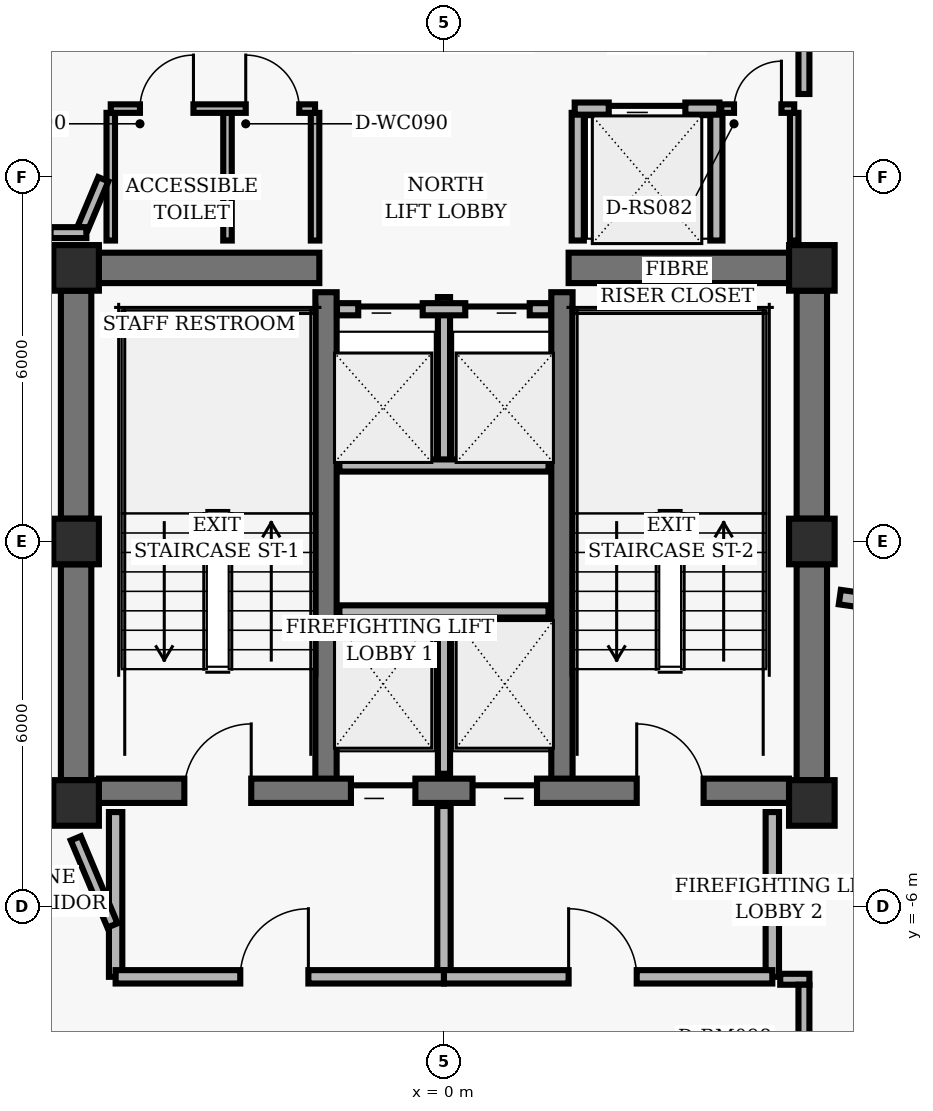
"""IFC4 building model, lengths in metres.
Left out: names, types, materials, properties, quantities, classifications, styles, units other than length and angle.
Written with IfcOpenShell. Run it as: python <this file> out.ifc"""

import sys

from ifc_helpers import new_model, si_unit, direction, frame, frame_2d, origin, origin_2d, place, context, subcontext, project, spatial, rectangle, hollow_rectangle, extrude, element, fill, save


model = new_model("IFC4")
c1 = context("Model", 3, precision=1e-05, world=origin(), true_north=direction((0.0, 1.0)))
c2 = subcontext(c1, "Body", "Model", "MODEL_VIEW")
j1 = project(units=[si_unit("LENGTHUNIT", "METRE"), si_unit("PLANEANGLEUNIT", "RADIAN")], contexts=[c1])
p1 = place(None, origin())
s1 = spatial("IfcSite", under=j1, at=p1, CompositionType="ELEMENT")
p2 = place(p1, origin())
s2 = spatial("IfcBuilding", under=s1, at=p2, CompositionType="ELEMENT")
p3 = place(p2, frame((0.0, 0.0, 205.76)))
s3 = spatial("IfcBuildingStorey", under=s2, at=p3, CompositionType="ELEMENT", Elevation=205.76)
for number, where, z_axis, x_axis in (
    (1, (-6.05, 4.5, 0.0), (0.0, 0.0, 1.0), (1.0, 0.0, 0.0)),
    (2, (6.05, 4.5, 0.0), (0.0, 0.0, 1.0), (1.0, 0.0, 0.0)),
    (3, (-6.05, 0.0, 0.0), (0.0, 0.0, 1.0), (1.0, 0.0, 0.0)),
    (4, (6.05, 0.0, 0.0), (0.0, 0.0, 1.0), (1.0, 0.0, 0.0)),
    (5, (-6.05, -4.3, 0.0), (0.0, 0.0, 1.0), (1.0, 0.0, 0.0)),
    (6, (6.05, -4.3, 0.0), (0.0, 0.0, 1.0), (1.0, 0.0, 0.0)),
):
    element("IfcColumn", number, at=place(p3, frame(where, z_axis=z_axis, x_axis=x_axis)), inside=s3, PredefinedType="COLUMN", context=c2, shape_type="SweptSolid", body=[
        extrude(hollow_rectangle(XDim=0.75, YDim=0.75, WallThickness=0.05, InnerFilletRadius=0.02, OuterFilletRadius=0.04, at=origin_2d()), origin(), (0.0, 0.0, 1.0), 3.04),
    ])
p4 = place(p3, frame((-6.05, 0.375, 0.0), z_axis=(0.0, 0.0, 1.0), x_axis=(0.0, 1.0, 0.0)))
e7 = element("IfcWall", 7, at=p4, inside=s3, PredefinedType="SHEAR", context=c2, shape_type="SweptSolid", body=[
    extrude(rectangle(XDim=3.75, YDim=0.5, at=frame_2d((1.875, 0.0))), origin(), (0.0, 0.0, 1.0), 2.798),
])
p5 = place(p3, frame((-6.05, -3.925, 0.0), z_axis=(0.0, 0.0, 1.0), x_axis=(0.0, 1.0, 0.0)))
e8 = element("IfcWall", 8, at=p5, inside=s3, PredefinedType="SHEAR", context=c2, shape_type="SweptSolid", body=[
    extrude(rectangle(XDim=3.55, YDim=0.5, at=frame_2d((1.775, 0.0))), origin(), (0.0, 0.0, 1.0), 2.798),
])
p6 = place(p3, frame((6.05, 0.375, 0.0), z_axis=(0.0, 0.0, 1.0), x_axis=(0.0, 1.0, 0.0)))
e9 = element("IfcWall", 9, at=p6, inside=s3, PredefinedType="SHEAR", context=c2, shape_type="SweptSolid", body=[
    extrude(rectangle(XDim=3.75, YDim=0.5, at=frame_2d((1.875, 0.0))), origin(), (0.0, 0.0, 1.0), 2.798),
])
p7 = place(p3, frame((6.05, -3.925, 0.0), z_axis=(0.0, 0.0, 1.0), x_axis=(0.0, 1.0, 0.0)))
e10 = element("IfcWall", 10, at=p7, inside=s3, PredefinedType="SHEAR", context=c2, shape_type="SweptSolid", body=[
    extrude(rectangle(XDim=3.55, YDim=0.5, at=frame_2d((1.775, 0.0))), origin(), (0.0, 0.0, 1.0), 2.798),
])
for number, where, z_axis, x_axis in (
    (11, (-1.94, -4.1, 0.0), (0.0, 0.0, 1.0), (0.0, 1.0, 0.0)),
    (12, (1.94, -4.1, 0.0), (0.0, 0.0, 1.0), (0.0, 1.0, 0.0)),
):
    element("IfcWall", number, at=place(p3, frame(where, z_axis=z_axis, x_axis=x_axis)), inside=s3, PredefinedType="SHEAR", context=c2, shape_type="SweptSolid", body=[
        extrude(rectangle(XDim=8.2, YDim=0.35, at=frame_2d((4.1, 0.0))), origin(), (0.0, 0.0, 1.0), 2.798),
    ])
p8 = place(p3, frame((-5.675, -4.1, 0.0), z_axis=(0.0, 0.0, 1.0), x_axis=(1.0, 0.0, 0.0)))
e13 = element("IfcWall", 13, at=p8, inside=s3, PredefinedType="SHEAR", context=c2, shape_type="SweptSolid", body=[
    extrude(rectangle(XDim=11.35, YDim=0.4, at=frame_2d((5.675, 0.0))), origin(), (0.0, 0.0, 1.0), 2.798),
])
p9 = place(p8, frame((1.405, 0.0, 0.0)))
e14 = element("IfcOpeningElement", 14, at=p9, cuts=e13, PredefinedType="OPENING", context=c2, shape_type="SweptSolid", body=[
    extrude(rectangle(XDim=1.1, YDim=2.04, at=frame_2d((0.55, 1.02))), frame((0.0, 0.21, 0.0), z_axis=(0.0, -1.0, 0.0), x_axis=(1.0, 0.0, 0.0)), (0.0, 0.0, 1.0), 0.42),
])
p10 = place(p8, frame((8.845, 0.0, 0.0)))
e15 = element("IfcOpeningElement", 15, at=p10, cuts=e13, PredefinedType="OPENING", context=c2, shape_type="SweptSolid", body=[
    extrude(rectangle(XDim=1.1, YDim=2.04, at=frame_2d((0.55, 1.02))), frame((0.0, 0.21, 0.0), z_axis=(0.0, -1.0, 0.0), x_axis=(1.0, 0.0, 0.0)), (0.0, 0.0, 1.0), 0.42),
])
p11 = place(p8, frame((4.145, 0.0, 0.0)))
e16 = element("IfcOpeningElement", 16, at=p11, cuts=e13, PredefinedType="OPENING", context=c2, shape_type="SweptSolid", body=[
    extrude(rectangle(XDim=1.06, YDim=2.04, at=frame_2d((0.53, 1.02))), frame((0.0, 0.21, 0.0), z_axis=(0.0, -1.0, 0.0), x_axis=(1.0, 0.0, 0.0)), (0.0, 0.0, 1.0), 0.42),
])
p12 = place(p8, frame((6.145, 0.0, 0.0)))
e17 = element("IfcOpeningElement", 17, at=p12, cuts=e13, PredefinedType="OPENING", context=c2, shape_type="SweptSolid", body=[
    extrude(rectangle(XDim=1.06, YDim=2.04, at=frame_2d((0.53, 1.02))), frame((0.0, 0.21, 0.0), z_axis=(0.0, -1.0, 0.0), x_axis=(1.0, 0.0, 0.0)), (0.0, 0.0, 1.0), 0.42),
])
for number, where, z_axis, x_axis in (
    (18, (-5.675, 4.5, 0.0), (0.0, 0.0, 1.0), (1.0, 0.0, 0.0)),
    (19, (2.05, 4.5, 0.0), (0.0, 0.0, 1.0), (1.0, 0.0, 0.0)),
):
    element("IfcWall", number, at=place(p3, frame(where, z_axis=z_axis, x_axis=x_axis)), inside=s3, PredefinedType="SHEAR", context=c2, shape_type="SweptSolid", body=[
        extrude(rectangle(XDim=3.625, YDim=0.5, at=frame_2d((1.812, 0.0))), origin(), (0.0, 0.0, 1.0), 2.798),
    ])
p13 = place(p3, frame((0.0, -3.82, 0.0), z_axis=(0.0, 0.0, 1.0), x_axis=(0.0, 1.0, 0.0)))
e20 = element("IfcWall", 20, at=p13, inside=s3, PredefinedType="PARTITIONING", context=c2, shape_type="SweptSolid", body=[
    extrude(rectangle(XDim=2.67, YDim=0.2, at=frame_2d((1.335, 0.0))), origin(), (0.0, 0.0, 1.0), 2.773),
])
p14 = place(p3, frame((-1.72, -1.15, 0.0), z_axis=(0.0, 0.0, 1.0), x_axis=(1.0, 0.0, 0.0)))
e21 = element("IfcWall", 21, at=p14, inside=s3, PredefinedType="PARTITIONING", context=c2, shape_type="SweptSolid", body=[
    extrude(rectangle(XDim=3.44, YDim=0.2, at=frame_2d((1.72, 0.0))), origin(), (0.0, 0.0, 1.0), 2.773),
])
for number, where, z_axis, x_axis in (
    (22, (-5.4, -7.16, 0.0), (0.0, 0.0, 1.0), (0.0, 1.0, 0.0)),
    (23, (5.4, -7.16, 0.0), (0.0, 0.0, 1.0), (0.0, 1.0, 0.0)),
):
    element("IfcWall", number, at=place(p3, frame(where, z_axis=z_axis, x_axis=x_axis)), inside=s3, PredefinedType="PARTITIONING", context=c2, shape_type="SweptSolid", body=[
        extrude(rectangle(XDim=2.71, YDim=0.22, at=frame_2d((1.355, 0.0))), origin(), (0.0, 0.0, 1.0), 2.773),
    ])
p15 = place(p3, frame((0.0, -7.16, 0.0), z_axis=(0.0, 0.0, 1.0), x_axis=(0.0, 1.0, 0.0)))
e24 = element("IfcWall", 24, at=p15, inside=s3, PredefinedType="PARTITIONING", context=c2, shape_type="SweptSolid", body=[
    extrude(rectangle(XDim=2.81, YDim=0.22, at=frame_2d((1.405, 0.0))), origin(), (0.0, 0.0, 1.0), 2.773),
])
p16 = place(p3, frame((-5.4, -7.16, 0.0), z_axis=(0.0, 0.0, 1.0), x_axis=(1.0, 0.0, 0.0)))
e25 = element("IfcWall", 25, at=p16, inside=s3, PredefinedType="PARTITIONING", context=c2, shape_type="SweptSolid", body=[
    extrude(rectangle(XDim=5.4, YDim=0.22, at=frame_2d((2.7, 0.0))), origin(), (0.0, 0.0, 1.0), 2.395),
])
p17 = place(p16, frame((2.05, 0.0, 0.0)))
e26 = element("IfcOpeningElement", 26, at=p17, cuts=e25, PredefinedType="OPENING", context=c2, shape_type="SweptSolid", body=[
    extrude(rectangle(XDim=1.12, YDim=2.02, at=frame_2d((0.56, 1.01))), frame((0.0, 0.12, 0.0), z_axis=(0.0, -1.0, 0.0), x_axis=(1.0, 0.0, 0.0)), (0.0, 0.0, 1.0), 0.24),
])
p18 = place(p3, frame((0.0, -7.16, 0.0), z_axis=(0.0, 0.0, 1.0), x_axis=(1.0, 0.0, 0.0)))
e27 = element("IfcWall", 27, at=p18, inside=s3, PredefinedType="PARTITIONING", context=c2, shape_type="SweptSolid", body=[
    extrude(rectangle(XDim=5.4, YDim=0.22, at=frame_2d((2.7, 0.0))), origin(), (0.0, 0.0, 1.0), 2.773),
])
p19 = place(p18, frame((2.05, 0.0, 0.0)))
e28 = element("IfcOpeningElement", 28, at=p19, cuts=e27, PredefinedType="OPENING", context=c2, shape_type="SweptSolid", body=[
    extrude(rectangle(XDim=1.12, YDim=2.02, at=frame_2d((0.56, 1.01))), frame((0.0, 0.12, 0.0), z_axis=(0.0, -1.0, 0.0), x_axis=(1.0, 0.0, 0.0)), (0.0, 0.0, 1.0), 0.24),
])
p20 = place(p3, frame((0.0, 1.25, 0.0), z_axis=(0.0, 0.0, 1.0), x_axis=(0.0, 1.0, 0.0)))
e29 = element("IfcWall", 29, at=p20, inside=s3, PredefinedType="PARTITIONING", context=c2, shape_type="SweptSolid", body=[
    extrude(rectangle(XDim=2.77, YDim=0.2, at=frame_2d((1.385, 0.0))), origin(), (0.0, 0.0, 1.0), 2.773),
])
p21 = place(p3, frame((-1.72, 1.25, 0.0), z_axis=(0.0, 0.0, 1.0), x_axis=(1.0, 0.0, 0.0)))
e30 = element("IfcWall", 30, at=p21, inside=s3, PredefinedType="PARTITIONING", context=c2, shape_type="SweptSolid", body=[
    extrude(rectangle(XDim=3.44, YDim=0.2, at=frame_2d((1.72, 0.0))), origin(), (0.0, 0.0, 1.0), 2.773),
])
p22 = place(p3, frame((-1.76, 3.82, 0.0), z_axis=(0.0, 0.0, 1.0), x_axis=(1.0, 0.0, 0.0)))
e31 = element("IfcWall", 31, at=p22, inside=s3, PredefinedType="PARTITIONING", context=c2, shape_type="SweptSolid", body=[
    extrude(rectangle(XDim=3.52, YDim=0.2, at=frame_2d((1.76, 0.0))), origin(), (0.0, 0.0, 1.0), 2.773),
])
p23 = place(p22, frame((0.35, 0.0, 0.0)))
e32 = element("IfcOpeningElement", 32, at=p23, cuts=e31, PredefinedType="OPENING", context=c2, shape_type="SweptSolid", body=[
    extrude(rectangle(XDim=1.06, YDim=2.04, at=frame_2d((0.53, 1.02))), frame((0.0, 0.11, 0.0), z_axis=(0.0, -1.0, 0.0), x_axis=(1.0, 0.0, 0.0)), (0.0, 0.0, 1.0), 0.22),
])
p24 = place(p22, frame((2.11, 0.0, 0.0)))
e33 = element("IfcOpeningElement", 33, at=p24, cuts=e31, PredefinedType="OPENING", context=c2, shape_type="SweptSolid", body=[
    extrude(rectangle(XDim=1.06, YDim=2.04, at=frame_2d((0.53, 1.02))), frame((0.0, 0.11, 0.0), z_axis=(0.0, -1.0, 0.0), x_axis=(1.0, 0.0, 0.0)), (0.0, 0.0, 1.0), 0.22),
])
for number, where, z_axis, x_axis in (
    (34, (2.2, 4.95, 0.0), (0.0, 0.0, 1.0), (0.0, 1.0, 0.0)),
    (35, (4.48, 4.95, 0.0), (0.0, 0.0, 1.0), (0.0, 1.0, 0.0)),
):
    element("IfcWall", number, at=place(p3, frame(where, z_axis=z_axis, x_axis=x_axis)), inside=s3, PredefinedType="PARTITIONING", context=c2, shape_type="SweptSolid", body=[
        extrude(rectangle(XDim=2.1, YDim=0.2, at=frame_2d((1.05, 0.0))), origin(), (0.0, 0.0, 1.0), 2.773),
    ])
p25 = place(p3, frame((2.15, 7.12, 0.0), z_axis=(0.0, 0.0, 1.0), x_axis=(1.0, 0.0, 0.0)))
e36 = element("IfcWall", 36, at=p25, inside=s3, PredefinedType="PARTITIONING", context=c2, shape_type="SweptSolid", body=[
    extrude(rectangle(XDim=2.38, YDim=0.2, at=frame_2d((1.19, 0.0))), origin(), (0.0, 0.0, 1.0), 2.773),
])
p26 = place(p25, frame((0.56, 0.0, 0.0)))
e37 = element("IfcOpeningElement", 37, at=p26, cuts=e36, PredefinedType="OPENING", context=c2, shape_type="SweptSolid", body=[
    extrude(rectangle(XDim=1.26, YDim=2.06, at=frame_2d((0.63, 1.03))), frame((0.0, 0.11, 0.0), z_axis=(0.0, -1.0, 0.0), x_axis=(1.0, 0.0, 0.0)), (0.0, 0.0, 1.0), 0.22),
])
for number, where, z_axis, x_axis in (
    (38, (-5.48, 4.95, 0.0), (0.0, 0.0, 1.0), (0.0, 1.0, 0.0)),
    (39, (-3.56, 4.95, 0.0), (0.0, 0.0, 1.0), (0.0, 1.0, 0.0)),
    (40, (-2.12, 4.95, 0.0), (0.0, 0.0, 1.0), (0.0, 1.0, 0.0)),
):
    element("IfcWall", number, at=place(p3, frame(where, z_axis=z_axis, x_axis=x_axis)), inside=s3, PredefinedType="PARTITIONING", context=c2, shape_type="SweptSolid", body=[
        extrude(rectangle(XDim=2.1, YDim=0.14, at=frame_2d((1.05, 0.0))), origin(), (0.0, 0.0, 1.0), 2.773),
    ])
p27 = place(p3, frame((-5.48, 7.12, 0.0), z_axis=(0.0, 0.0, 1.0), x_axis=(1.0, 0.0, 0.0)))
e41 = element("IfcWall", 41, at=p27, inside=s3, PredefinedType="PARTITIONING", context=c2, shape_type="SweptSolid", body=[
    extrude(rectangle(XDim=3.36, YDim=0.14, at=frame_2d((1.68, 0.0))), origin(), (0.0, 0.0, 1.0), 2.773),
])
p28 = place(p27, frame((0.48, 0.0, 0.0)))
e42 = element("IfcOpeningElement", 42, at=p28, cuts=e41, PredefinedType="OPENING", context=c2, shape_type="SweptSolid", body=[
    extrude(rectangle(XDim=0.88, YDim=2.02, at=frame_2d((0.44, 1.01))), frame((0.0, 0.08, 0.0), z_axis=(0.0, -1.0, 0.0), x_axis=(1.0, 0.0, 0.0)), (0.0, 0.0, 1.0), 0.16),
])
p29 = place(p27, frame((2.22, 0.0, 0.0)))
e43 = element("IfcOpeningElement", 43, at=p29, cuts=e41, PredefinedType="OPENING", context=c2, shape_type="SweptSolid", body=[
    extrude(rectangle(XDim=0.88, YDim=2.02, at=frame_2d((0.44, 1.01))), frame((0.0, 0.08, 0.0), z_axis=(0.0, -1.0, 0.0), x_axis=(1.0, 0.0, 0.0)), (0.0, 0.0, 1.0), 0.16),
])
p30 = place(p3, frame((5.76, 4.95, 0.0), z_axis=(0.0, 0.0, 1.0), x_axis=(0.0, 1.0, 0.0)))
e44 = element("IfcWall", 44, at=p30, inside=s3, PredefinedType="PARTITIONING", context=c2, shape_type="SweptSolid", body=[
    extrude(rectangle(XDim=2.1, YDim=0.14, at=frame_2d((1.05, 0.0))), origin(), (0.0, 0.0, 1.0), 2.253),
])
p31 = place(p3, frame((4.56, 7.12, 0.0), z_axis=(0.0, 0.0, 1.0), x_axis=(1.0, 0.0, 0.0)))
e45 = element("IfcWall", 45, at=p31, inside=s3, PredefinedType="PARTITIONING", context=c2, shape_type="SweptSolid", body=[
    extrude(rectangle(XDim=1.2, YDim=0.14, at=frame_2d((0.6, 0.0))), origin(), (0.0, 0.0, 1.0), 2.773),
])
p32 = place(p31, frame((0.21, 0.0, 0.0)))
e46 = element("IfcOpeningElement", 46, at=p32, cuts=e45, PredefinedType="OPENING", context=c2, shape_type="SweptSolid", body=[
    extrude(rectangle(XDim=0.78, YDim=2.01, at=frame_2d((0.39, 1.005))), frame((0.0, 0.08, 0.0), z_axis=(0.0, -1.0, 0.0), x_axis=(1.0, 0.0, 0.0)), (0.0, 0.0, 1.0), 0.16),
])
p33 = place(p3, frame((5.92, 9.16, 0.0), z_axis=(0.0, 0.0, 1.0), x_axis=(0.0, -1.0, 0.0)))
e47 = element("IfcWall", 47, at=p33, inside=s3, PredefinedType="PARTITIONING", context=c2, shape_type="SweptSolid", body=[
    extrude(rectangle(XDim=1.8, YDim=0.18, at=frame_2d((0.9, 0.0))), origin(), (0.0, 0.0, 1.0), 2.773),
])
p34 = place(p3, frame((-5.602, 5.958, 0.0), z_axis=(0.0, 0.0, 1.0), x_axis=(-0.387588639363, -0.921832439566, 0.0)))
e48 = element("IfcWall", 48, at=p34, inside=s3, PredefinedType="PARTITIONING", context=c2, shape_type="SweptSolid", body=[
    extrude(rectangle(XDim=0.862, YDim=0.18, at=frame_2d((0.431, 0.0))), origin(), (0.0, 0.0, 1.0), 2.773),
])
p35 = place(p3, frame((-5.881, 5.08, 0.0), z_axis=(0.0, 0.0, 1.0), x_axis=(-1.0, 0.0, 0.0)))
e49 = element("IfcWall", 49, at=p35, inside=s3, PredefinedType="PARTITIONING", context=c2, shape_type="SweptSolid", body=[
    extrude(rectangle(XDim=0.589, YDim=0.18, at=frame_2d((0.294, 0.0))), origin(), (0.0, 0.0, 1.0), 2.773),
])
p36 = place(p3, frame((-6.055, -4.882, 0.0), z_axis=(0.0, 0.0, 1.0), x_axis=(0.387579540458, -0.921836265189, 0.0)))
e50 = element("IfcWall", 50, at=p36, inside=s3, PredefinedType="PARTITIONING", context=c2, shape_type="SweptSolid", body=[
    extrude(rectangle(XDim=1.555, YDim=0.18, at=frame_2d((0.777, 0.0))), origin(), (0.0, 0.0, 1.0), 2.253),
])
p37 = place(p3, frame((5.53, -7.2, 0.0), z_axis=(0.0, 0.0, 1.0), x_axis=(1.0, 0.0, 0.0)))
e51 = element("IfcWall", 51, at=p37, inside=s3, PredefinedType="PARTITIONING", context=c2, shape_type="SweptSolid", body=[
    extrude(rectangle(XDim=0.48, YDim=0.18, at=frame_2d((0.24, 0.0))), origin(), (0.0, 0.0, 1.0), 2.773),
])
p38 = place(p3, frame((5.92, -7.29, 0.0), z_axis=(0.0, 0.0, 1.0), x_axis=(0.0, -1.0, 0.0)))
e52 = element("IfcWall", 52, at=p38, inside=s3, PredefinedType="PARTITIONING", context=c2, shape_type="SweptSolid", body=[
    extrude(rectangle(XDim=1.82, YDim=0.18, at=frame_2d((0.91, 0.0))), origin(), (0.0, 0.0, 1.0), 2.773),
])
p39 = place(p3, frame((6.51, -0.915, 0.0), z_axis=(0.0, 0.0, 1.0), x_axis=(0.990267505523, -0.139177108413, 0.0)))
e53 = element("IfcWall", 53, at=p39, inside=s3, PredefinedType="PARTITIONING", context=c2, shape_type="SweptSolid", body=[
    extrude(rectangle(XDim=5.727, YDim=0.24, at=frame_2d((2.864, 0.0))), origin(), (0.0, 0.0, 1.0), 2.773),
])
p40 = place(p9, origin())
e54 = element("IfcDoor", 54, at=p40, inside=s3, OperationType="SINGLE_SWING_RIGHT", PredefinedType="DOOR", context=c2, shape_type="SweptSolid", body=[
    extrude(rectangle(XDim=1.1, YDim=2.04, at=frame_2d((0.55, 1.02))), frame((0.0, 0.025, 0.0), z_axis=(0.0, -1.0, 0.0), x_axis=(1.0, 0.0, 0.0)), (0.0, 0.0, 1.0), 0.05),
])
fill(e14, e54)
p41 = place(p10, origin())
e55 = element("IfcDoor", 55, at=p41, inside=s3, OperationType="SINGLE_SWING_LEFT", PredefinedType="DOOR", context=c2, shape_type="SweptSolid", body=[
    extrude(rectangle(XDim=1.1, YDim=2.04, at=frame_2d((0.55, 1.02))), frame((0.0, 0.025, 0.0), z_axis=(0.0, -1.0, 0.0), x_axis=(1.0, 0.0, 0.0)), (0.0, 0.0, 1.0), 0.05),
])
fill(e15, e55)
p42 = place(p11, origin())
e56 = element("IfcDoor", 56, at=p42, inside=s3, OperationType="SLIDING_TO_LEFT", PredefinedType="DOOR", context=c2, shape_type="SweptSolid", body=[
    extrude(rectangle(XDim=1.06, YDim=2.04, at=frame_2d((0.53, 1.02))), frame((0.0, 0.025, 0.0), z_axis=(0.0, -1.0, 0.0), x_axis=(1.0, 0.0, 0.0)), (0.0, 0.0, 1.0), 0.05),
])
fill(e16, e56)
p43 = place(p12, origin())
e57 = element("IfcDoor", 57, at=p43, inside=s3, OperationType="SLIDING_TO_RIGHT", PredefinedType="DOOR", context=c2, shape_type="SweptSolid", body=[
    extrude(rectangle(XDim=1.06, YDim=2.04, at=frame_2d((0.53, 1.02))), frame((0.0, 0.025, 0.0), z_axis=(0.0, -1.0, 0.0), x_axis=(1.0, 0.0, 0.0)), (0.0, 0.0, 1.0), 0.05),
])
fill(e17, e57)
p44 = place(p17, origin())
e58 = element("IfcDoor", 58, at=p44, inside=s3, OperationType="SINGLE_SWING_RIGHT", PredefinedType="DOOR", context=c2, shape_type="SweptSolid", body=[
    extrude(rectangle(XDim=1.12, YDim=2.02, at=frame_2d((0.56, 1.01))), frame((0.0, 0.025, 0.0), z_axis=(0.0, -1.0, 0.0), x_axis=(1.0, 0.0, 0.0)), (0.0, 0.0, 1.0), 0.05),
])
fill(e26, e58)
p45 = place(p19, origin())
e59 = element("IfcDoor", 59, at=p45, inside=s3, OperationType="SINGLE_SWING_LEFT", PredefinedType="DOOR", context=c2, shape_type="SweptSolid", body=[
    extrude(rectangle(XDim=1.12, YDim=2.02, at=frame_2d((0.56, 1.01))), frame((0.0, 0.025, 0.0), z_axis=(0.0, -1.0, 0.0), x_axis=(1.0, 0.0, 0.0)), (0.0, 0.0, 1.0), 0.05),
])
fill(e28, e59)
p46 = place(p23, origin())
e60 = element("IfcDoor", 60, at=p46, inside=s3, OperationType="SLIDING_TO_LEFT", PredefinedType="DOOR", context=c2, shape_type="SweptSolid", body=[
    extrude(rectangle(XDim=1.06, YDim=2.04, at=frame_2d((0.53, 1.02))), frame((0.0, 0.025, 0.0), z_axis=(0.0, -1.0, 0.0), x_axis=(1.0, 0.0, 0.0)), (0.0, 0.0, 1.0), 0.05),
])
fill(e32, e60)
p47 = place(p24, origin())
e61 = element("IfcDoor", 61, at=p47, inside=s3, OperationType="SLIDING_TO_RIGHT", PredefinedType="DOOR", context=c2, shape_type="SweptSolid", body=[
    extrude(rectangle(XDim=1.06, YDim=2.04, at=frame_2d((0.53, 1.02))), frame((0.0, 0.025, 0.0), z_axis=(0.0, -1.0, 0.0), x_axis=(1.0, 0.0, 0.0)), (0.0, 0.0, 1.0), 0.05),
])
fill(e33, e61)
p48 = place(p26, origin())
e62 = element("IfcDoor", 62, at=p48, inside=s3, OperationType="SLIDING_TO_LEFT", PredefinedType="DOOR", context=c2, shape_type="SweptSolid", body=[
    extrude(rectangle(XDim=1.26, YDim=2.06, at=frame_2d((0.63, 1.03))), frame((0.0, 0.025, 0.0), z_axis=(0.0, -1.0, 0.0), x_axis=(1.0, 0.0, 0.0)), (0.0, 0.0, 1.0), 0.05),
])
fill(e37, e62)
p49 = place(p28, origin())
e63 = element("IfcDoor", 63, at=p49, inside=s3, OperationType="SINGLE_SWING_RIGHT", PredefinedType="DOOR", context=c2, shape_type="SweptSolid", body=[
    extrude(rectangle(XDim=0.88, YDim=2.02, at=frame_2d((0.44, 1.01))), frame((0.0, 0.025, 0.0), z_axis=(0.0, -1.0, 0.0), x_axis=(1.0, 0.0, 0.0)), (0.0, 0.0, 1.0), 0.05),
])
fill(e42, e63)
p50 = place(p29, origin())
e64 = element("IfcDoor", 64, at=p50, inside=s3, OperationType="SINGLE_SWING_LEFT", PredefinedType="DOOR", context=c2, shape_type="SweptSolid", body=[
    extrude(rectangle(XDim=0.88, YDim=2.02, at=frame_2d((0.44, 1.01))), frame((0.0, 0.025, 0.0), z_axis=(0.0, -1.0, 0.0), x_axis=(1.0, 0.0, 0.0)), (0.0, 0.0, 1.0), 0.05),
])
fill(e43, e64)
p51 = place(p32, origin())
e65 = element("IfcDoor", 65, at=p51, inside=s3, OperationType="SINGLE_SWING_RIGHT", PredefinedType="DOOR", context=c2, shape_type="SweptSolid", body=[
    extrude(rectangle(XDim=0.78, YDim=2.01, at=frame_2d((0.39, 1.005))), frame((0.0, 0.025, 0.0), z_axis=(0.0, -1.0, 0.0), x_axis=(1.0, 0.0, 0.0)), (0.0, 0.0, 1.0), 0.05),
])
fill(e46, e65)
save(model, sys.argv[1])
